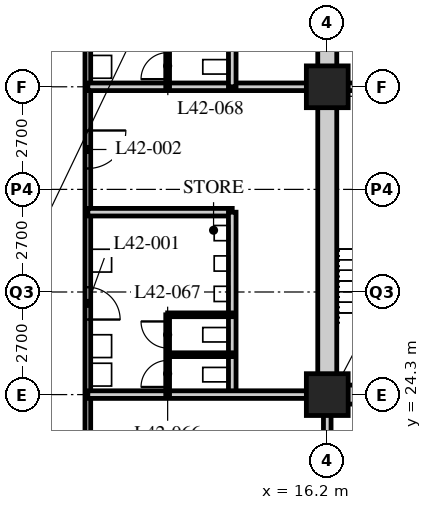
"""IFC4 building model, lengths in metres.
Left out: names, types, materials, properties, quantities, classifications, styles, units other than length and angle.
Written with IfcOpenShell. Run it as: python <this file> out.ifc"""

import sys

from ifc_helpers import new_model, si_unit, direction, frame, frame_2d, origin, origin_2d, place, context, subcontext, project, spatial, rectangle, hollow_rectangle, extrude, element, fill, save


model = new_model("IFC4")
c1 = context("Model", 3, precision=1e-05, world=origin(), true_north=direction((0.0, 1.0)))
c2 = subcontext(c1, "Body", "Model", "MODEL_VIEW")
j1 = project(units=[si_unit("LENGTHUNIT", "METRE"), si_unit("PLANEANGLEUNIT", "RADIAN")], contexts=[c1])
p1 = place(None, origin())
s1 = spatial("IfcSite", under=j1, at=p1, CompositionType="ELEMENT")
p2 = place(p1, origin())
s2 = spatial("IfcBuilding", under=s1, at=p2, CompositionType="ELEMENT")
p3 = place(p2, frame((0.0, 0.0, 165.0)))
s3 = spatial("IfcBuildingStorey", under=s2, at=p3, CompositionType="ELEMENT", Elevation=165.0)
for number, where, z_axis, x_axis in (
    (1, (16.2, 24.3, 0.0), (0.0, 0.0, 1.0), (1.0, 0.0, 0.0)),
    (2, (16.2, 32.4, 0.0), (0.0, 0.0, 1.0), (1.0, 0.0, 0.0)),
):
    element("IfcColumn", number, at=place(p3, frame(where, z_axis=z_axis, x_axis=x_axis)), inside=s3, PredefinedType="COLUMN", context=c2, shape_type="SweptSolid", body=[
        extrude(hollow_rectangle(XDim=1.1, YDim=1.1, WallThickness=0.1, at=origin_2d()), origin(), (0.0, 0.0, 1.0), 5.4),
    ])
p4 = place(p3, frame((9.9, 49.5, 0.0), z_axis=(0.0, 0.0, 1.0), x_axis=(0.0, -1.0, 0.0)))
e3 = element("IfcWall", 3, at=p4, inside=s3, PredefinedType="PARTITIONING", context=c2, shape_type="SweptSolid", body=[
    extrude(rectangle(XDim=28.8, YDim=0.15, at=frame_2d((14.4, 0.0))), origin(), (0.0, 0.0, 1.0), 5.19),
])
p5 = place(p4, frame((22.375, 0.0, 0.0)))
e4 = element("IfcOpeningElement", 4, at=p5, cuts=e3, PredefinedType="OPENING", context=c2, shape_type="SweptSolid", body=[
    extrude(rectangle(XDim=0.85, YDim=2.1, at=frame_2d((0.425, 1.05))), frame((0.0, 0.085, 0.0), z_axis=(0.0, -1.0, 0.0), x_axis=(1.0, 0.0, 0.0)), (0.0, 0.0, 1.0), 0.17),
])
p6 = place(p4, frame((18.25, 0.0, 0.0)))
e5 = element("IfcOpeningElement", 5, at=p6, cuts=e3, PredefinedType="OPENING", context=c2, shape_type="SweptSolid", body=[
    extrude(rectangle(XDim=1.0, YDim=2.1, at=frame_2d((0.5, 1.05))), frame((0.0, 0.085, 0.0), z_axis=(0.0, -1.0, 0.0), x_axis=(1.0, 0.0, 0.0)), (0.0, 0.0, 1.0), 0.17),
])
p7 = place(p4, frame((13.875, 0.0, 0.0)))
e6 = element("IfcOpeningElement", 6, at=p7, cuts=e3, PredefinedType="OPENING", context=c2, shape_type="SweptSolid", body=[
    extrude(rectangle(XDim=0.85, YDim=2.1, at=frame_2d((0.425, 1.05))), frame((0.0, 0.085, 0.0), z_axis=(0.0, -1.0, 0.0), x_axis=(1.0, 0.0, 0.0)), (0.0, 0.0, 1.0), 0.17),
])
p8 = place(p4, frame((9.75, 0.0, 0.0)))
e7 = element("IfcOpeningElement", 7, at=p8, cuts=e3, PredefinedType="OPENING", context=c2, shape_type="SweptSolid", body=[
    extrude(rectangle(XDim=1.0, YDim=2.1, at=frame_2d((0.5, 1.05))), frame((0.0, 0.085, 0.0), z_axis=(0.0, -1.0, 0.0), x_axis=(1.0, 0.0, 0.0)), (0.0, 0.0, 1.0), 0.17),
])
p9 = place(p3, frame((9.9, 32.4, 0.0), z_axis=(0.0, 0.0, 1.0), x_axis=(1.0, 0.0, 0.0)))
e8 = element("IfcWall", 8, at=p9, inside=s3, PredefinedType="SOLIDWALL", context=c2, shape_type="SweptSolid", body=[
    extrude(rectangle(XDim=6.3, YDim=0.2, at=frame_2d((3.15, 0.0))), origin(), (0.0, 0.0, 1.0), 5.19),
])
p10 = place(p3, frame((9.9, 29.1, 0.0), z_axis=(0.0, 0.0, 1.0), x_axis=(1.0, 0.0, 0.0)))
e9 = element("IfcWall", 9, at=p10, inside=s3, PredefinedType="SOLIDWALL", context=c2, shape_type="SweptSolid", body=[
    extrude(rectangle(XDim=3.8, YDim=0.2, at=frame_2d((1.9, 0.0))), origin(), (0.0, 0.0, 1.0), 5.19),
])
p11 = place(p3, frame((13.7, 24.3, 0.0), z_axis=(0.0, 0.0, 1.0), x_axis=(0.0, 1.0, 0.0)))
e10 = element("IfcWall", 10, at=p11, inside=s3, PredefinedType="SOLIDWALL", context=c2, shape_type="SweptSolid", body=[
    extrude(rectangle(XDim=4.8, YDim=0.2, at=frame_2d((2.4, 0.0))), origin(), (0.0, 0.0, 1.0), 5.19),
])
p12 = place(p3, frame((13.7, 32.4, 0.0), z_axis=(0.0, 0.0, 1.0), x_axis=(0.0, 1.0, 0.0)))
e11 = element("IfcWall", 11, at=p12, inside=s3, PredefinedType="SOLIDWALL", context=c2, shape_type="SweptSolid", body=[
    extrude(rectangle(XDim=5.6, YDim=0.2, at=frame_2d((2.8, 0.0))), origin(), (0.0, 0.0, 1.0), 5.19),
])
p13 = place(p3, frame((16.2, 20.7, 0.0), z_axis=(0.0, 0.0, 1.0), x_axis=(0.0, 1.0, 0.0)))
e12 = element("IfcWall", 12, at=p13, inside=s3, PredefinedType="SOLIDWALL", context=c2, shape_type="SweptSolid", body=[
    extrude(rectangle(XDim=3.6, YDim=0.2, at=frame_2d((1.8, 0.0))), origin(), (0.0, 0.0, 1.0), 4.42),
])
p14 = place(p3, frame((9.9, 24.3, 0.0), z_axis=(0.0, 0.0, 1.0), x_axis=(1.0, 0.0, 0.0)))
e13 = element("IfcWall", 13, at=p14, inside=s3, PredefinedType="SOLIDWALL", context=c2, shape_type="SweptSolid", body=[
    extrude(rectangle(XDim=6.3, YDim=0.2, at=frame_2d((3.15, 0.0))), origin(), (0.0, 0.0, 1.0), 5.19),
])
p15 = place(p3, frame((12.0, 24.3, 0.0), z_axis=(0.0, 0.0, 1.0), x_axis=(0.0, 1.0, 0.0)))
e14 = element("IfcWall", 14, at=p15, inside=s3, PredefinedType="PARTITIONING", context=c2, shape_type="SweptSolid", body=[
    extrude(rectangle(XDim=2.1, YDim=0.1, at=frame_2d((1.05, 0.0))), origin(), (0.0, 0.0, 1.0), 5.19),
])
p16 = place(p15, frame((0.2, 0.0, 0.0)))
e15 = element("IfcOpeningElement", 15, at=p16, cuts=e14, PredefinedType="OPENING", context=c2, shape_type="SweptSolid", body=[
    extrude(rectangle(XDim=0.7, YDim=2.0, at=frame_2d((0.35, 1.0))), frame((0.0, 0.06, 0.0), z_axis=(0.0, -1.0, 0.0), x_axis=(1.0, 0.0, 0.0)), (0.0, 0.0, 1.0), 0.12),
])
p17 = place(p15, frame((1.225, 0.0, 0.0)))
e16 = element("IfcOpeningElement", 16, at=p17, cuts=e14, PredefinedType="OPENING", context=c2, shape_type="SweptSolid", body=[
    extrude(rectangle(XDim=0.7, YDim=2.0, at=frame_2d((0.35, 1.0))), frame((0.0, 0.06, 0.0), z_axis=(0.0, -1.0, 0.0), x_axis=(1.0, 0.0, 0.0)), (0.0, 0.0, 1.0), 0.12),
])
for number, where, z_axis, x_axis in (
    (17, (12.0, 25.35, 0.0), (0.0, 0.0, 1.0), (1.0, 0.0, 0.0)),
    (18, (12.0, 26.4, 0.0), (0.0, 0.0, 1.0), (1.0, 0.0, 0.0)),
):
    element("IfcWall", number, at=place(p3, frame(where, z_axis=z_axis, x_axis=x_axis)), inside=s3, PredefinedType="PARTITIONING", context=c2, shape_type="SweptSolid", body=[
        extrude(rectangle(XDim=1.7, YDim=0.1, at=frame_2d((0.85, 0.0))), origin(), (0.0, 0.0, 1.0), 5.19),
    ])
p18 = place(p3, frame((12.0, 32.4, 0.0), z_axis=(0.0, 0.0, 1.0), x_axis=(0.0, 1.0, 0.0)))
e19 = element("IfcWall", 19, at=p18, inside=s3, PredefinedType="PARTITIONING", context=c2, shape_type="SweptSolid", body=[
    extrude(rectangle(XDim=5.25, YDim=0.1, at=frame_2d((2.625, 0.0))), origin(), (0.0, 0.0, 1.0), 5.19),
])
p19 = place(p18, frame((0.2, 0.0, 0.0)))
e20 = element("IfcOpeningElement", 20, at=p19, cuts=e19, PredefinedType="OPENING", context=c2, shape_type="SweptSolid", body=[
    extrude(rectangle(XDim=0.7, YDim=2.0, at=frame_2d((0.35, 1.0))), frame((0.0, 0.06, 0.0), z_axis=(0.0, -1.0, 0.0), x_axis=(1.0, 0.0, 0.0)), (0.0, 0.0, 1.0), 0.12),
])
p20 = place(p18, frame((1.225, 0.0, 0.0)))
e21 = element("IfcOpeningElement", 21, at=p20, cuts=e19, PredefinedType="OPENING", context=c2, shape_type="SweptSolid", body=[
    extrude(rectangle(XDim=0.7, YDim=2.0, at=frame_2d((0.35, 1.0))), frame((0.0, 0.06, 0.0), z_axis=(0.0, -1.0, 0.0), x_axis=(1.0, 0.0, 0.0)), (0.0, 0.0, 1.0), 0.12),
])
p21 = place(p18, frame((2.275, 0.0, 0.0)))
e22 = element("IfcOpeningElement", 22, at=p21, cuts=e19, PredefinedType="OPENING", context=c2, shape_type="SweptSolid", body=[
    extrude(rectangle(XDim=0.7, YDim=2.0, at=frame_2d((0.35, 1.0))), frame((0.0, 0.06, 0.0), z_axis=(0.0, -1.0, 0.0), x_axis=(1.0, 0.0, 0.0)), (0.0, 0.0, 1.0), 0.12),
])
p22 = place(p18, frame((3.325, 0.0, 0.0)))
e23 = element("IfcOpeningElement", 23, at=p22, cuts=e19, PredefinedType="OPENING", context=c2, shape_type="SweptSolid", body=[
    extrude(rectangle(XDim=0.7, YDim=2.0, at=frame_2d((0.35, 1.0))), frame((0.0, 0.06, 0.0), z_axis=(0.0, -1.0, 0.0), x_axis=(1.0, 0.0, 0.0)), (0.0, 0.0, 1.0), 0.12),
])
p23 = place(p18, frame((4.375, 0.0, 0.0)))
e24 = element("IfcOpeningElement", 24, at=p23, cuts=e19, PredefinedType="OPENING", context=c2, shape_type="SweptSolid", body=[
    extrude(rectangle(XDim=0.7, YDim=2.0, at=frame_2d((0.35, 1.0))), frame((0.0, 0.06, 0.0), z_axis=(0.0, -1.0, 0.0), x_axis=(1.0, 0.0, 0.0)), (0.0, 0.0, 1.0), 0.12),
])
p24 = place(p3, frame((15.95, 24.3, 0.0), z_axis=(0.0, 0.0, 1.0), x_axis=(1.0, 0.0, 0.0)))
e25 = element("IfcWall", 25, at=p24, inside=s3, PredefinedType="SOLIDWALL", context=c2, shape_type="SweptSolid", body=[
    extrude(rectangle(XDim=24.8, YDim=0.5, at=frame_2d((12.4, 0.0))), origin(), (0.0, 0.0, 1.0), 4.42),
])
p25 = place(p24, frame((11.5, 0.0, 0.0)))
e26 = element("IfcOpeningElement", 26, at=p25, cuts=e25, PredefinedType="OPENING", context=c2, shape_type="SweptSolid", body=[
    extrude(rectangle(XDim=1.8, YDim=2.4, at=frame_2d((0.9, 1.2))), frame((0.0, 0.26, 0.0), z_axis=(0.0, -1.0, 0.0), x_axis=(1.0, 0.0, 0.0)), (0.0, 0.0, 1.0), 0.52),
])
p26 = place(p3, frame((16.2, 24.55, 0.0), z_axis=(0.0, 0.0, 1.0), x_axis=(0.0, 1.0, 0.0)))
e27 = element("IfcWall", 27, at=p26, inside=s3, PredefinedType="SOLIDWALL", context=c2, shape_type="SweptSolid", body=[
    extrude(rectangle(XDim=15.7, YDim=0.5, at=frame_2d((7.85, 0.0))), origin(), (0.0, 0.0, 1.0), 4.42),
])
p27 = place(p3, frame((16.45, 32.4, 0.0), z_axis=(0.0, 0.0, 1.0), x_axis=(1.0, 0.0, 0.0)))
e28 = element("IfcWall", 28, at=p27, inside=s3, PredefinedType="SOLIDWALL", context=c2, shape_type="SweptSolid", body=[
    extrude(rectangle(XDim=7.95, YDim=0.2, at=frame_2d((3.975, 0.0))), origin(), (0.0, 0.0, 1.0), 4.578),
])
p28 = place(p5, origin())
e29 = element("IfcDoor", 29, at=p28, inside=s3, OperationType="SINGLE_SWING_RIGHT", PredefinedType="DOOR", context=c2, shape_type="SweptSolid", body=[
    extrude(rectangle(XDim=0.85, YDim=2.1, at=frame_2d((0.425, 1.05))), frame((0.0, 0.025, 0.0), z_axis=(0.0, -1.0, 0.0), x_axis=(1.0, 0.0, 0.0)), (0.0, 0.0, 1.0), 0.05),
])
fill(e4, e29)
p29 = place(p6, origin())
e30 = element("IfcDoor", 30, at=p29, inside=s3, OperationType="SINGLE_SWING_LEFT", PredefinedType="DOOR", context=c2, shape_type="SweptSolid", body=[
    extrude(rectangle(XDim=1.0, YDim=2.1, at=frame_2d((0.5, 1.05))), frame((0.0, 0.025, 0.0), z_axis=(0.0, -1.0, 0.0), x_axis=(1.0, 0.0, 0.0)), (0.0, 0.0, 1.0), 0.05),
])
fill(e5, e30)
p30 = place(p16, origin())
e31 = element("IfcDoor", 31, at=p30, inside=s3, OperationType="SINGLE_SWING_LEFT", PredefinedType="DOOR", context=c2, shape_type="SweptSolid", body=[
    extrude(rectangle(XDim=0.7, YDim=2.0, at=frame_2d((0.35, 1.0))), frame((0.0, 0.025, 0.0), z_axis=(0.0, -1.0, 0.0), x_axis=(1.0, 0.0, 0.0)), (0.0, 0.0, 1.0), 0.05),
])
fill(e15, e31)
p31 = place(p17, origin())
e32 = element("IfcDoor", 32, at=p31, inside=s3, OperationType="SINGLE_SWING_RIGHT", PredefinedType="DOOR", context=c2, shape_type="SweptSolid", body=[
    extrude(rectangle(XDim=0.7, YDim=2.0, at=frame_2d((0.35, 1.0))), frame((0.0, 0.025, 0.0), z_axis=(0.0, -1.0, 0.0), x_axis=(1.0, 0.0, 0.0)), (0.0, 0.0, 1.0), 0.05),
])
fill(e16, e32)
p32 = place(p19, origin())
e33 = element("IfcDoor", 33, at=p32, inside=s3, OperationType="SINGLE_SWING_LEFT", PredefinedType="DOOR", context=c2, shape_type="SweptSolid", body=[
    extrude(rectangle(XDim=0.7, YDim=2.0, at=frame_2d((0.35, 1.0))), frame((0.0, 0.025, 0.0), z_axis=(0.0, -1.0, 0.0), x_axis=(1.0, 0.0, 0.0)), (0.0, 0.0, 1.0), 0.05),
])
fill(e20, e33)
save(model, sys.argv[1])
